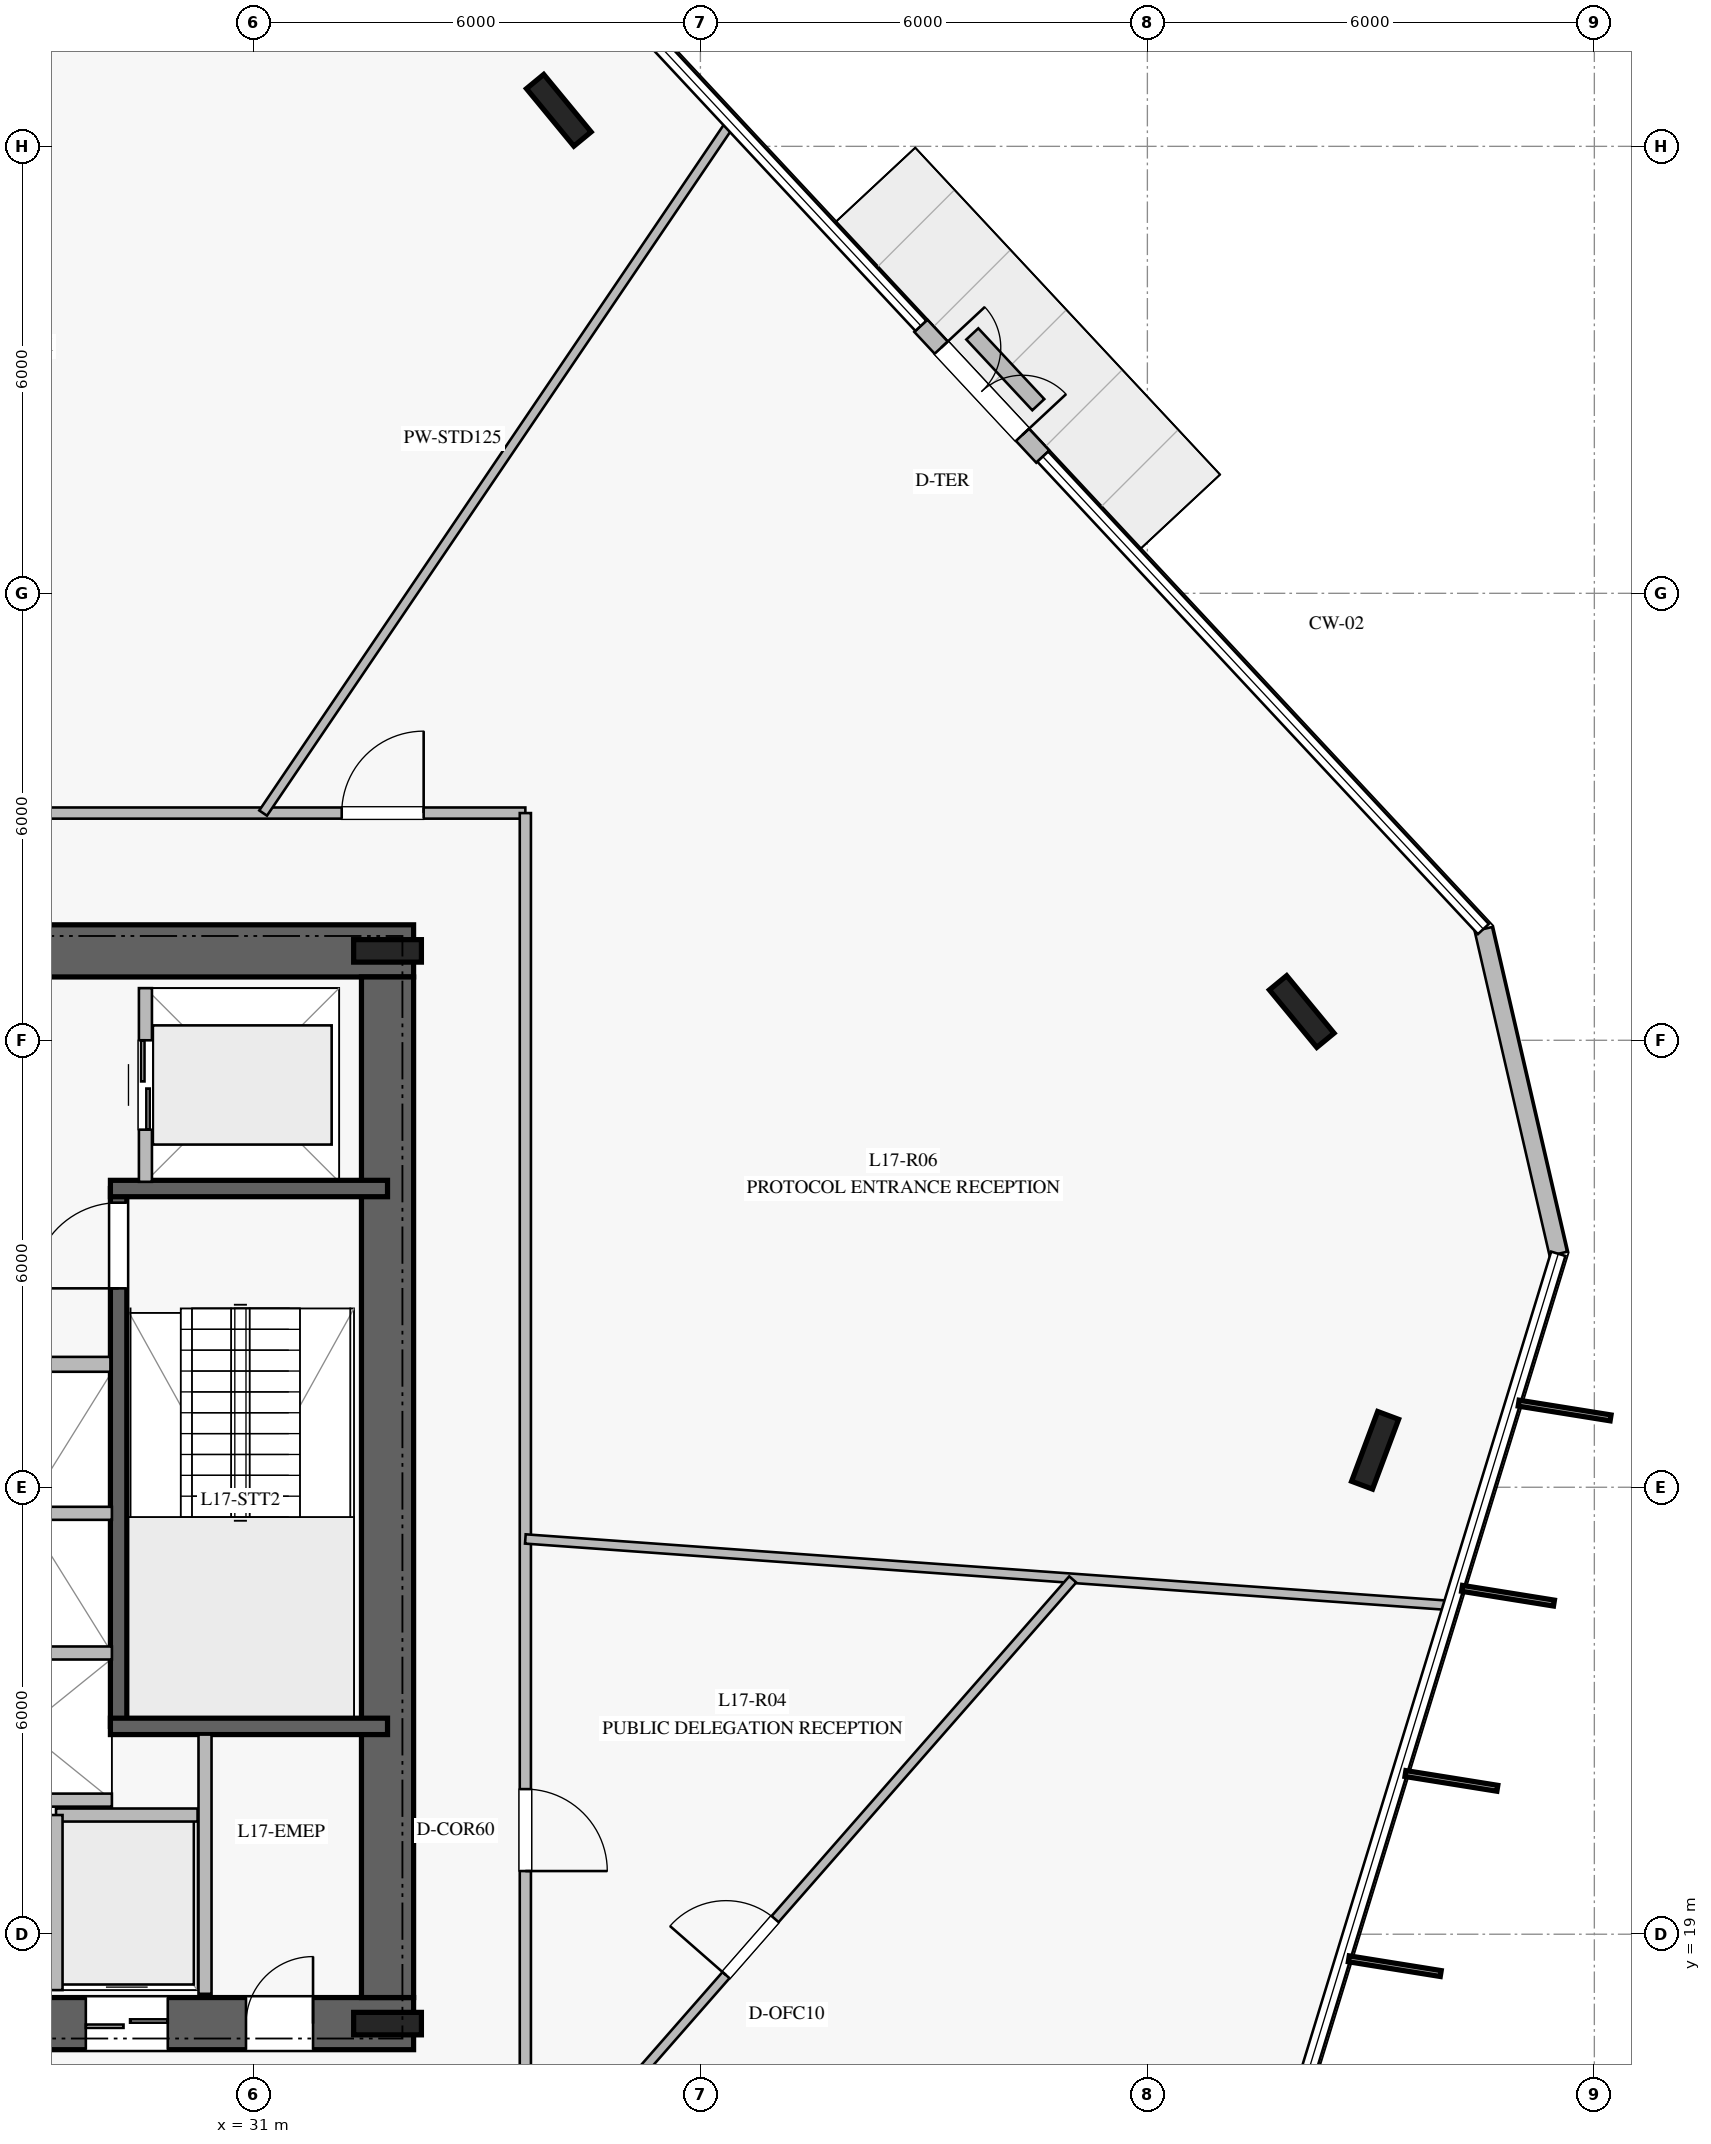
"""IFC4 building model, lengths in metres.
Left out: names, types, materials, properties, quantities, classifications, styles, units other than length and angle.
Written with IfcOpenShell. Run it as: python <this file> out.ifc"""

import sys

from ifc_helpers import new_model, si_unit, direction, frame, frame_2d, origin, origin_2d, place, context, subcontext, project, spatial, rectangle, i_section, extrude, element, fill, save


model = new_model("IFC4")
c1 = context("Model", 3, precision=1e-05, world=origin(), true_north=direction((0.0, 1.0)))
c2 = subcontext(c1, "Body", "Model", "MODEL_VIEW")
j1 = project(units=[si_unit("LENGTHUNIT", "METRE"), si_unit("PLANEANGLEUNIT", "RADIAN")], contexts=[c1])
p1 = place(None, origin())
s1 = spatial("IfcSite", under=j1, at=p1, CompositionType="ELEMENT")
p2 = place(p1, origin())
s2 = spatial("IfcBuilding", under=s1, at=p2, CompositionType="ELEMENT")
p3 = place(p2, frame((0.0, 0.0, 72.0)))
s3 = spatial("IfcBuildingStorey", under=s2, at=p3, CompositionType="ELEMENT", Elevation=72.0)
p4 = place(p3, frame((16.85, 17.8, 0.0), z_axis=(0.0, 0.0, 1.0), x_axis=(1.0, 0.0, 0.0)))
e1 = element("IfcWall", 1, at=p4, inside=s3, PredefinedType="SHEAR", context=c2, shape_type="SweptSolid", body=[
    extrude(rectangle(XDim=16.3, YDim=0.7, at=frame_2d((8.15, 0.0))), origin(), (0.0, 0.0, 1.0), 3.76),
])
p5 = place(p4, frame((5.1, 0.0, 0.0)))
e2 = element("IfcOpeningElement", 2, at=p5, cuts=e1, PredefinedType="OPENING", context=c2, shape_type="SweptSolid", body=[
    extrude(rectangle(XDim=1.2, YDim=2.25, at=frame_2d((0.6, 1.125))), frame((0.0, 0.36, 0.0), z_axis=(0.0, -1.0, 0.0), x_axis=(1.0, 0.0, 0.0)), (0.0, 0.0, 1.0), 0.72),
])
p6 = place(p4, frame((14.05, 0.0, 0.0)))
e3 = element("IfcOpeningElement", 3, at=p6, cuts=e1, PredefinedType="OPENING", context=c2, shape_type="SweptSolid", body=[
    extrude(rectangle(XDim=0.9, YDim=2.1, at=frame_2d((0.45, 1.05))), frame((0.0, 0.36, 0.0), z_axis=(0.0, -1.0, 0.0), x_axis=(1.0, 0.0, 0.0)), (0.0, 0.0, 1.0), 0.72),
])
p7 = place(p4, frame((7.95, 0.0, 0.0)))
e4 = element("IfcOpeningElement", 4, at=p7, cuts=e1, PredefinedType="OPENING", context=c2, shape_type="SweptSolid", body=[
    extrude(rectangle(XDim=1.1, YDim=2.2, at=frame_2d((0.55, 1.1))), frame((0.0, 0.36, 0.0), z_axis=(0.0, -1.0, 0.0), x_axis=(1.0, 0.0, 0.0)), (0.0, 0.0, 1.0), 0.72),
])
p8 = place(p4, frame((9.925, 0.0, 0.0)))
e5 = element("IfcOpeningElement", 5, at=p8, cuts=e1, PredefinedType="OPENING", context=c2, shape_type="SweptSolid", body=[
    extrude(rectangle(XDim=1.1, YDim=2.2, at=frame_2d((0.55, 1.1))), frame((0.0, 0.36, 0.0), z_axis=(0.0, -1.0, 0.0), x_axis=(1.0, 0.0, 0.0)), (0.0, 0.0, 1.0), 0.72),
])
p9 = place(p4, frame((11.9, 0.0, 0.0)))
e6 = element("IfcOpeningElement", 6, at=p9, cuts=e1, PredefinedType="OPENING", context=c2, shape_type="SweptSolid", body=[
    extrude(rectangle(XDim=1.1, YDim=2.2, at=frame_2d((0.55, 1.1))), frame((0.0, 0.36, 0.0), z_axis=(0.0, -1.0, 0.0), x_axis=(1.0, 0.0, 0.0)), (0.0, 0.0, 1.0), 0.72),
])
p10 = place(p3, frame((33.15, 32.2, 0.0), z_axis=(0.0, 0.0, 1.0), x_axis=(-1.0, 0.0, 0.0)))
e7 = element("IfcWall", 7, at=p10, inside=s3, PredefinedType="SHEAR", context=c2, shape_type="SweptSolid", body=[
    extrude(rectangle(XDim=16.3, YDim=0.7, at=frame_2d((8.15, 0.0))), origin(), (0.0, 0.0, 1.0), 3.76),
])
p11 = place(p10, frame((5.1, 0.0, 0.0)))
e8 = element("IfcOpeningElement", 8, at=p11, cuts=e7, PredefinedType="OPENING", context=c2, shape_type="SweptSolid", body=[
    extrude(rectangle(XDim=1.2, YDim=2.25, at=frame_2d((0.6, 1.125))), frame((0.0, 0.36, 0.0), z_axis=(0.0, -1.0, 0.0), x_axis=(1.0, 0.0, 0.0)), (0.0, 0.0, 1.0), 0.72),
])
p12 = place(p3, frame((32.8, 18.15, 0.0), z_axis=(0.0, 0.0, 1.0), x_axis=(0.0, 1.0, 0.0)))
e9 = element("IfcWall", 9, at=p12, inside=s3, PredefinedType="SHEAR", context=c2, shape_type="SweptSolid", body=[
    extrude(rectangle(XDim=13.7, YDim=0.7, at=frame_2d((6.85, 0.0))), origin(), (0.0, 0.0, 1.0), 3.76),
])
for number, where, z_axis, x_axis in (
    (10, (32.8, 17.8, 0.0), (0.0, 0.0, 1.0), (1.0, 0.0, 0.0)),
    (11, (32.8, 32.2, 0.0), (0.0, 0.0, 1.0), (1.0, 0.0, 0.0)),
):
    element("IfcColumn", number, at=place(p3, frame(where, z_axis=z_axis, x_axis=x_axis)), inside=s3, PredefinedType="COLUMN", context=c2, shape_type="SweptSolid", body=[
        extrude(i_section(OverallWidth=0.302, OverallDepth=0.91, WebThickness=0.021, FlangeThickness=0.04, at=origin_2d()), origin(), (0.0, 0.0, 1.0), 4.0),
    ])
p13 = place(p3, frame((29.19, 21.79, 0.0), z_axis=(0.0, 0.0, 1.0), x_axis=(0.0, 1.0, 0.0)))
e12 = element("IfcWall", 12, at=p13, inside=s3, PredefinedType="SOLIDWALL", context=c2, shape_type="SweptSolid", body=[
    extrude(rectangle(XDim=7.22, YDim=0.22, at=frame_2d((3.61, 0.0))), origin(), (0.0, 0.0, 1.0), 3.76),
])
p14 = place(p13, frame((5.88, 0.0, 0.0)))
e13 = element("IfcOpeningElement", 13, at=p14, cuts=e12, PredefinedType="OPENING", context=c2, shape_type="SweptSolid", body=[
    extrude(rectangle(XDim=1.15, YDim=2.2, at=frame_2d((0.575, 1.1))), frame((0.0, 0.12, 0.0), z_axis=(0.0, -1.0, 0.0), x_axis=(1.0, 0.0, 0.0)), (0.0, 0.0, 1.0), 0.24),
])
for number, where, z_axis, x_axis in (
    (14, (29.08, 21.79, 0.0), (0.0, 0.0, 1.0), (1.0, 0.0, 0.0)),
    (15, (29.08, 29.01, 0.0), (0.0, 0.0, 1.0), (1.0, 0.0, 0.0)),
):
    element("IfcWall", number, at=place(p3, frame(where, z_axis=z_axis, x_axis=x_axis)), inside=s3, PredefinedType="SOLIDWALL", context=c2, shape_type="SweptSolid", body=[
        extrude(rectangle(XDim=3.72, YDim=0.22, at=frame_2d((1.86, 0.0))), origin(), (0.0, 0.0, 1.0), 3.76),
    ])
for number, where, z_axis, x_axis in (
    (16, (45.072, 31.386, 0.0), (0.0, 0.0, 1.0), (-0.636, 0.772, 0.0)),
    (17, (35.099, 43.484, 0.0), (0.0, 0.0, 1.0), (-0.636, 0.772, 0.0)),
    (18, (46.057, 25.496, 0.0), (0.0, 0.0, 1.0), (0.35, 0.937, 0.0)),
):
    element("IfcColumn", number, at=place(p3, frame(where, z_axis=z_axis, x_axis=x_axis)), inside=s3, PredefinedType="COLUMN", context=c2, shape_type="SweptSolid", body=[
        extrude(i_section(OverallWidth=0.3, OverallDepth=1.0, WebThickness=0.019, FlangeThickness=0.036, at=origin_2d()), origin(), (0.0, 0.0, 1.0), 4.0),
    ])
p15 = place(p3, frame((41.596, 38.835, 0.0), z_axis=(0.0, 0.0, 1.0), x_axis=(-0.681857956093, 0.731484605246, 0.0)))
e19 = element("IfcWall", 19, at=p15, inside=s3, PredefinedType="STANDARD", context=c2, shape_type="SweptSolid", body=[
    extrude(rectangle(XDim=2.401, YDim=0.24, at=frame_2d((1.2, 0.0))), origin(), (0.0, 0.0, 1.0), 3.76),
])
p16 = place(p15, frame((0.4, 0.0, 0.0)))
e20 = element("IfcOpeningElement", 20, at=p16, cuts=e19, PredefinedType="OPENING", context=c2, shape_type="SweptSolid", body=[
    extrude(rectangle(XDim=1.6, YDim=2.25, at=frame_2d((0.8, 1.125))), frame((0.0, 0.13, 0.0), z_axis=(0.0, -1.0, 0.0), x_axis=(1.0, 0.0, 0.0)), (0.0, 0.0, 1.0), 0.26),
])
p17 = place(p3, frame((48.516, 28.134, 0.0), z_axis=(0.0, 0.0, 1.0), x_axis=(-0.224903350388, 0.974381076881, 0.0)))
e21 = element("IfcWall", 21, at=p17, inside=s3, PredefinedType="STANDARD", context=c2, shape_type="SweptSolid", body=[
    extrude(rectangle(XDim=4.473, YDim=0.24, at=frame_2d((2.237, 0.0))), origin(), (0.0, 0.0, 1.0), 3.76),
])
p18 = place(p3, frame((41.536, 39.532, 0.0), z_axis=(0.0, 0.0, 1.0), x_axis=(-0.682057046315, 0.731298971401, 0.0)))
e22 = element("IfcWall", 22, at=p18, inside=s3, PredefinedType="USERDEFINED", context=c2, shape_type="SweptSolid", body=[
    extrude(rectangle(XDim=1.299, YDim=0.22, at=frame_2d((0.649, 0.0))), origin(), (0.0, 0.0, 1.0), 0.4),
])
p19 = place(p3, frame((25.7, 26.65, 0.0), z_axis=(0.0, 0.0, 1.0), x_axis=(1.0, 0.0, 0.0)))
e23 = element("IfcWall", 23, at=p19, inside=s3, PredefinedType="PARTITIONING", context=c2, shape_type="SweptSolid", body=[
    extrude(rectangle(XDim=3.38, YDim=0.2, at=frame_2d((1.69, 0.0))), origin(), (0.0, 0.0, 1.0), 3.76),
])
p20 = place(p3, frame((30.35, 18.2, 0.0), z_axis=(0.0, 0.0, 1.0), x_axis=(0.0, 1.0, 0.0)))
e24 = element("IfcWall", 24, at=p20, inside=s3, PredefinedType="PARTITIONING", context=c2, shape_type="SweptSolid", body=[
    extrude(rectangle(XDim=3.48, YDim=0.175, at=frame_2d((1.74, 0.0))), origin(), (0.0, 0.0, 1.0), 3.76),
])
p21 = place(p3, frame((28.35, 20.6, 0.0), z_axis=(0.0, 0.0, 1.0), x_axis=(1.0, 0.0, 0.0)))
e25 = element("IfcWall", 25, at=p21, inside=s3, PredefinedType="PARTITIONING", context=c2, shape_type="SweptSolid", body=[
    extrude(rectangle(XDim=1.9, YDim=0.175, at=frame_2d((0.95, 0.0))), origin(), (0.0, 0.0, 1.0), 3.76),
])
for number, where, z_axis, x_axis in (
    (26, (28.35, 18.25, 0.0), (0.0, 0.0, 1.0), (0.0, 1.0, 0.0)),
    (27, (26.75, 20.8, 0.0), (0.0, 0.0, 1.0), (1.0, 0.0, 0.0)),
    (28, (26.75, 22.775, 0.0), (0.0, 0.0, 1.0), (1.0, 0.0, 0.0)),
    (29, (26.75, 24.65, 0.0), (0.0, 0.0, 1.0), (1.0, 0.0, 0.0)),
):
    element("IfcWall", number, at=place(p3, frame(where, z_axis=z_axis, x_axis=x_axis)), inside=s3, PredefinedType="PARTITIONING", context=c2, shape_type="SweptSolid", body=[
        extrude(rectangle(XDim=2.35, YDim=0.175, at=frame_2d((1.175, 0.0))), origin(), (0.0, 0.0, 1.0), 3.76),
    ])
p22 = place(p3, frame((29.55, 29.1, 0.0), z_axis=(0.0, 0.0, 1.0), x_axis=(0.0, 1.0, 0.0)))
e30 = element("IfcWall", 30, at=p22, inside=s3, PredefinedType="PARTITIONING", context=c2, shape_type="SweptSolid", body=[
    extrude(rectangle(XDim=2.6, YDim=0.175, at=frame_2d((1.3, 0.0))), origin(), (0.0, 0.0, 1.0), 3.76),
])
p23 = place(p22, frame((0.7, 0.0, 0.0)))
e31 = element("IfcOpeningElement", 31, at=p23, cuts=e30, PredefinedType="OPENING", context=c2, shape_type="SweptSolid", body=[
    extrude(rectangle(XDim=1.2, YDim=2.2, at=frame_2d((0.6, 1.1))), frame((0.0, 0.098, 0.0), z_axis=(0.0, -1.0, 0.0), x_axis=(1.0, 0.0, 0.0)), (0.0, 0.0, 1.0), 0.195),
])
p24 = place(p3, frame((15.35, 34.05, 0.0), z_axis=(0.0, 0.0, 1.0), x_axis=(1.0, 0.0, 0.0)))
e32 = element("IfcWall", 32, at=p24, inside=s3, PredefinedType="PARTITIONING", context=c2, shape_type="SweptSolid", body=[
    extrude(rectangle(XDim=19.3, YDim=0.15, at=frame_2d((9.65, 0.0))), origin(), (0.0, 0.0, 1.0), 3.21),
])
p25 = place(p24, frame((16.835, 0.0, 0.0)))
e33 = element("IfcOpeningElement", 33, at=p25, cuts=e32, PredefinedType="OPENING", context=c2, shape_type="SweptSolid", body=[
    extrude(rectangle(XDim=1.1, YDim=2.2, at=frame_2d((0.55, 1.1))), frame((0.0, 0.085, 0.0), z_axis=(0.0, -1.0, 0.0), x_axis=(1.0, 0.0, 0.0)), (0.0, 0.0, 1.0), 0.17),
])
p26 = place(p24, frame((11.052, 0.0, 0.0)))
e34 = element("IfcOpeningElement", 34, at=p26, cuts=e32, PredefinedType="OPENING", context=c2, shape_type="SweptSolid", body=[
    extrude(rectangle(XDim=1.1, YDim=2.2, at=frame_2d((0.55, 1.1))), frame((0.0, 0.085, 0.0), z_axis=(0.0, -1.0, 0.0), x_axis=(1.0, 0.0, 0.0)), (0.0, 0.0, 1.0), 0.17),
])
p27 = place(p24, frame((3.318, 0.0, 0.0)))
e35 = element("IfcOpeningElement", 35, at=p27, cuts=e32, PredefinedType="OPENING", context=c2, shape_type="SweptSolid", body=[
    extrude(rectangle(XDim=1.1, YDim=2.2, at=frame_2d((0.55, 1.1))), frame((0.0, 0.085, 0.0), z_axis=(0.0, -1.0, 0.0), x_axis=(1.0, 0.0, 0.0)), (0.0, 0.0, 1.0), 0.17),
])
p28 = place(p3, frame((34.65, 34.05, 0.0), z_axis=(0.0, 0.0, 1.0), x_axis=(0.0, -1.0, 0.0)))
e36 = element("IfcWall", 36, at=p28, inside=s3, PredefinedType="PARTITIONING", context=c2, shape_type="SweptSolid", body=[
    extrude(rectangle(XDim=18.1, YDim=0.15, at=frame_2d((9.05, 0.0))), origin(), (0.0, 0.0, 1.0), 3.21),
])
p29 = place(p28, frame((13.102, 0.0, 0.0)))
e37 = element("IfcOpeningElement", 37, at=p29, cuts=e36, PredefinedType="OPENING", context=c2, shape_type="SweptSolid", body=[
    extrude(rectangle(XDim=1.1, YDim=2.2, at=frame_2d((0.55, 1.1))), frame((0.0, 0.085, 0.0), z_axis=(0.0, -1.0, 0.0), x_axis=(1.0, 0.0, 0.0)), (0.0, 0.0, 1.0), 0.17),
])
p30 = place(p3, frame((31.13, 34.05, 0.0), z_axis=(0.0, 0.0, 1.0), x_axis=(0.560811937369, 0.827943217198, 0.0)))
e38 = element("IfcWall", 38, at=p30, inside=s3, PredefinedType="PARTITIONING", context=c2, shape_type="SweptSolid", body=[
    extrude(rectangle(XDim=11.182, YDim=0.125, at=frame_2d((5.591, 0.0))), origin(), (0.0, 0.0, 1.0), 3.02),
])
p31 = place(p3, frame((34.65, 24.306, 0.0), z_axis=(0.0, 0.0, 1.0), x_axis=(0.997425610376, -0.071708798384, 0.0)))
e39 = element("IfcWall", 39, at=p31, inside=s3, PredefinedType="PARTITIONING", context=c2, shape_type="SweptSolid", body=[
    extrude(rectangle(XDim=12.437, YDim=0.125, at=frame_2d((6.219, 0.0))), origin(), (0.0, 0.0, 1.0), 3.05),
])
p32 = place(p3, frame((33.467, 14.026, 0.0), z_axis=(0.0, 0.0, 1.0), x_axis=(0.65898913026, 0.752152462071, 0.0)))
e40 = element("IfcWall", 40, at=p32, inside=s3, PredefinedType="PARTITIONING", context=c2, shape_type="SweptSolid", body=[
    extrude(rectangle(XDim=12.946, YDim=0.125, at=frame_2d((6.473, 0.0))), origin(), (0.0, 0.0, 1.0), 3.05),
])
p33 = place(p32, frame((5.883, 0.0, 0.0)))
e41 = element("IfcOpeningElement", 41, at=p33, cuts=e40, PredefinedType="OPENING", context=c2, shape_type="SweptSolid", body=[
    extrude(rectangle(XDim=1.0, YDim=2.15, at=frame_2d((0.5, 1.075))), frame((0.0, 0.073, 0.0), z_axis=(0.0, -1.0, 0.0), x_axis=(1.0, 0.0, 0.0)), (0.0, 0.0, 1.0), 0.145),
])
p34 = place(p16, frame((1.6, 0.0, 0.0), z_axis=(0.0, 0.0, 1.0), x_axis=(-1.0, 0.0, 0.0)))
e42 = element("IfcDoor", 42, at=p34, inside=s3, OperationType="DOUBLE_DOOR_SINGLE_SWING", PredefinedType="DOOR", context=c2, shape_type="SweptSolid", body=[
    extrude(rectangle(XDim=1.6, YDim=2.25, at=frame_2d((0.8, 1.125))), frame((0.0, 0.025, 0.0), z_axis=(0.0, -1.0, 0.0), x_axis=(1.0, 0.0, 0.0)), (0.0, 0.0, 1.0), 0.05),
])
fill(e20, e42)
p35 = place(p14, origin())
e43 = element("IfcDoor", 43, at=p35, inside=s3, OperationType="SINGLE_SWING_LEFT", PredefinedType="DOOR", context=c2, shape_type="SweptSolid", body=[
    extrude(rectangle(XDim=1.15, YDim=2.2, at=frame_2d((0.575, 1.1))), frame((0.0, 0.025, 0.0), z_axis=(0.0, -1.0, 0.0), x_axis=(1.0, 0.0, 0.0)), (0.0, 0.0, 1.0), 0.05),
])
fill(e13, e43)
p36 = place(p6, origin())
e44 = element("IfcDoor", 44, at=p36, inside=s3, OperationType="SINGLE_SWING_RIGHT", PredefinedType="DOOR", context=c2, shape_type="SweptSolid", body=[
    extrude(rectangle(XDim=0.9, YDim=2.1, at=frame_2d((0.45, 1.05))), frame((0.0, 0.025, 0.0), z_axis=(0.0, -1.0, 0.0), x_axis=(1.0, 0.0, 0.0)), (0.0, 0.0, 1.0), 0.05),
])
fill(e3, e44)
p37 = place(p9, origin())
e45 = element("IfcDoor", 45, at=p37, inside=s3, OperationType="DOUBLE_DOOR_SLIDING", PredefinedType="DOOR", context=c2, shape_type="SweptSolid", body=[
    extrude(rectangle(XDim=1.1, YDim=2.2, at=frame_2d((0.55, 1.1))), frame((0.0, 0.025, 0.0), z_axis=(0.0, -1.0, 0.0), x_axis=(1.0, 0.0, 0.0)), (0.0, 0.0, 1.0), 0.05),
])
fill(e6, e45)
p38 = place(p23, origin())
e46 = element("IfcDoor", 46, at=p38, inside=s3, OperationType="DOUBLE_DOOR_SLIDING", PredefinedType="DOOR", context=c2, shape_type="SweptSolid", body=[
    extrude(rectangle(XDim=1.2, YDim=2.2, at=frame_2d((0.6, 1.1))), frame((0.0, 0.025, 0.0), z_axis=(0.0, -1.0, 0.0), x_axis=(1.0, 0.0, 0.0)), (0.0, 0.0, 1.0), 0.05),
])
fill(e31, e46)
p39 = place(p29, origin())
e47 = element("IfcDoor", 47, at=p39, inside=s3, OperationType="SINGLE_SWING_RIGHT", PredefinedType="DOOR", context=c2, shape_type="SweptSolid", body=[
    extrude(rectangle(XDim=1.1, YDim=2.2, at=frame_2d((0.55, 1.1))), frame((0.0, 0.025, 0.0), z_axis=(0.0, -1.0, 0.0), x_axis=(1.0, 0.0, 0.0)), (0.0, 0.0, 1.0), 0.05),
])
fill(e37, e47)
p40 = place(p33, origin())
e48 = element("IfcDoor", 48, at=p40, inside=s3, OperationType="SINGLE_SWING_LEFT", PredefinedType="DOOR", context=c2, shape_type="SweptSolid", body=[
    extrude(rectangle(XDim=1.0, YDim=2.15, at=frame_2d((0.5, 1.075))), frame((0.0, 0.025, 0.0), z_axis=(0.0, -1.0, 0.0), x_axis=(1.0, 0.0, 0.0)), (0.0, 0.0, 1.0), 0.05),
])
fill(e41, e48)
p41 = place(p25, origin())
e49 = element("IfcDoor", 49, at=p41, inside=s3, OperationType="SINGLE_SWING_RIGHT", PredefinedType="DOOR", context=c2, shape_type="SweptSolid", body=[
    extrude(rectangle(XDim=1.1, YDim=2.2, at=frame_2d((0.55, 1.1))), frame((0.0, 0.025, 0.0), z_axis=(0.0, -1.0, 0.0), x_axis=(1.0, 0.0, 0.0)), (0.0, 0.0, 1.0), 0.05),
])
fill(e33, e49)
save(model, sys.argv[1])
